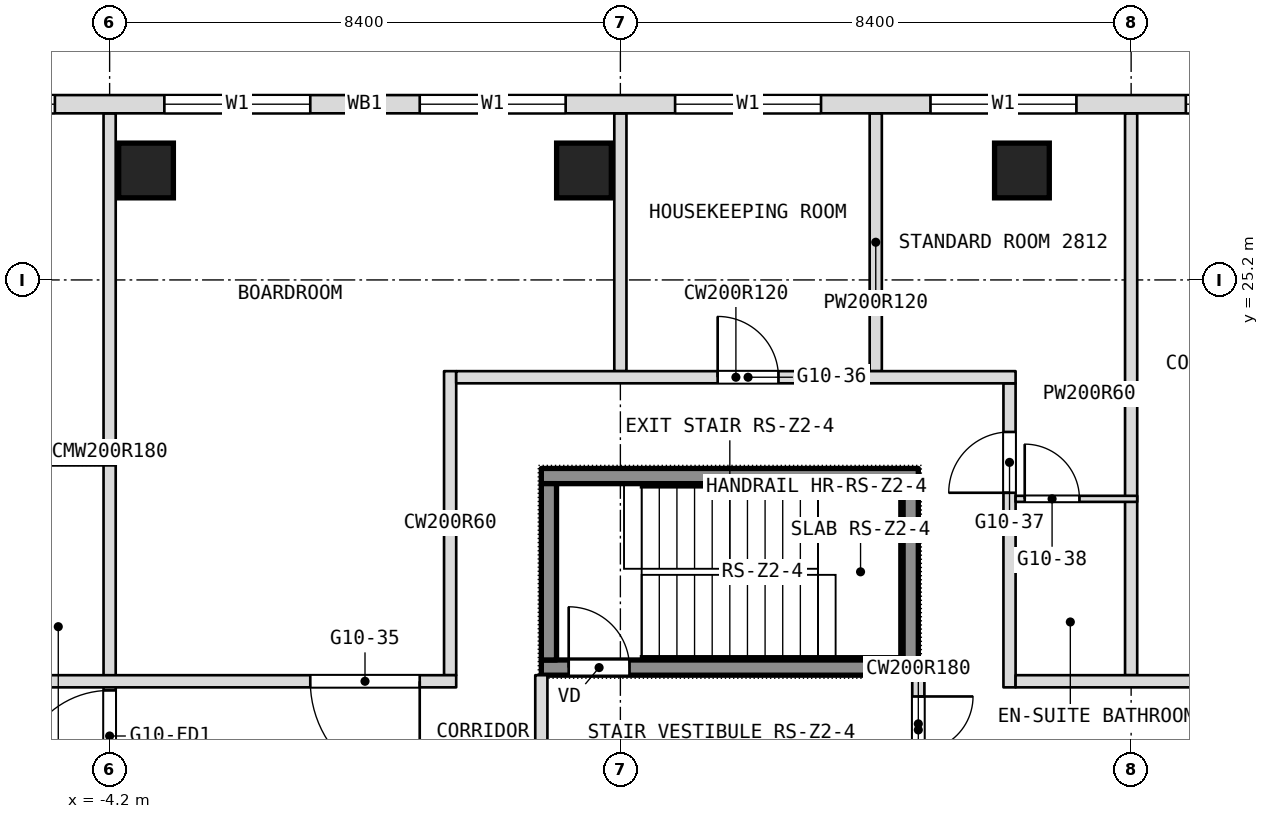
"""IFC4 building model, lengths in metres.
Left out: names, types, materials, properties, quantities, classifications, styles, units other than length and angle.
Written with IfcOpenShell. Run it as: python <this file> out.ifc"""

import sys

from ifc_helpers import new_model, si_unit, direction, frame, frame_2d, origin, origin_2d, place, context, subcontext, project, spatial, rectangle, extrude, element, fill, save


model = new_model("IFC4")
c1 = context("Model", 3, precision=1e-05, world=origin(), true_north=direction((0.0, 1.0)))
c2 = subcontext(c1, "Body", "Model", "MODEL_VIEW")
j1 = project(units=[si_unit("LENGTHUNIT", "METRE"), si_unit("PLANEANGLEUNIT", "RADIAN")], contexts=[c1])
p1 = place(None, origin())
s1 = spatial("IfcSite", under=j1, at=p1, CompositionType="ELEMENT")
p2 = place(p1, origin())
s2 = spatial("IfcBuilding", under=s1, at=p2, CompositionType="ELEMENT")
p3 = place(p2, frame((0.0, 0.0, 126.5)))
s3 = spatial("IfcBuildingStorey", under=s2, at=p3, CompositionType="ELEMENT", Elevation=126.5)
for number, where, z_axis, x_axis in (
    (1, (-3.601, 27.0, 0.0), (0.0, 0.0, 1.0), (1.0, 0.0, 0.0)),
    (2, (3.601, 27.0, 0.0), (0.0, 0.0, 1.0), (1.0, 0.0, 0.0)),
    (3, (10.804, 27.0, 0.0), (0.0, 0.0, 1.0), (1.0, 0.0, 0.0)),
):
    element("IfcColumn", number, at=place(p3, frame(where, z_axis=z_axis, x_axis=x_axis)), inside=s3, PredefinedType="COLUMN", context=c2, shape_type="SweptSolid", body=[
        extrude(rectangle(XDim=0.9, YDim=0.9, at=origin_2d()), origin(), (0.0, 0.0, 1.0), 3.6),
    ])
p4 = place(p3, frame((12.6, 18.7, 0.0), z_axis=(0.0, 0.0, 1.0), x_axis=(0.0, 1.0, 0.0)))
e4 = element("IfcWall", 4, at=p4, inside=s3, PredefinedType="PARTITIONING", context=c2, shape_type="SweptSolid", body=[
    extrude(rectangle(XDim=9.24, YDim=0.2, at=frame_2d((4.62, 0.0))), origin(), (0.0, 0.0, 1.0), 3.34),
])
p5 = place(p3, frame((10.6, 18.5, 0.0), z_axis=(0.0, 0.0, 1.0), x_axis=(0.0, 1.0, 0.0)))
e5 = element("IfcWall", 5, at=p5, inside=s3, PredefinedType="PARTITIONING", context=c2, shape_type="SweptSolid", body=[
    extrude(rectangle(XDim=5.0, YDim=0.2, at=frame_2d((2.5, 0.0))), origin(), (0.0, 0.0, 1.0), 3.34),
])
p6 = place(p5, frame((3.2, 0.0, 0.0)))
e6 = element("IfcOpeningElement", 6, at=p6, cuts=e5, PredefinedType="OPENING", context=c2, shape_type="SweptSolid", body=[
    extrude(rectangle(XDim=1.0, YDim=2.1, at=frame_2d((0.5, 1.05))), frame((0.0, 0.1, 0.0), z_axis=(0.0, -1.0, 0.0), x_axis=(1.0, 0.0, 0.0)), (0.0, 0.0, 1.0), 0.2),
])
p7 = place(p3, frame((9.1, 16.9, 0.0), z_axis=(0.0, 0.0, 1.0), x_axis=(0.0, 1.0, 0.0)))
e7 = element("IfcWall", 7, at=p7, inside=s3, PredefinedType="PARTITIONING", context=c2, shape_type="SweptSolid", body=[
    extrude(rectangle(XDim=1.8, YDim=0.2, at=frame_2d((0.9, 0.0))), origin(), (0.0, 0.0, 1.0), 3.34),
])
p8 = place(p7, frame((0.55, 0.0, 0.0)))
e8 = element("IfcOpeningElement", 8, at=p8, cuts=e7, PredefinedType="OPENING", context=c2, shape_type="SweptSolid", body=[
    extrude(rectangle(XDim=0.9, YDim=2.1, at=frame_2d((0.45, 1.05))), frame((0.0, 0.1, 0.0), z_axis=(0.0, -1.0, 0.0), x_axis=(1.0, 0.0, 0.0)), (0.0, 0.0, 1.0), 0.2),
])
for number, where, z_axis, x_axis in (
    (9, (8.4, 23.7, 0.0), (0.0, 0.0, 1.0), (0.0, 1.0, 0.0)),
    (10, (4.2, 23.7, 0.0), (0.0, 0.0, 1.0), (0.0, 1.0, 0.0)),
):
    element("IfcWall", number, at=place(p3, frame(where, z_axis=z_axis, x_axis=x_axis)), inside=s3, PredefinedType="PARTITIONING", context=c2, shape_type="SweptSolid", body=[
        extrude(rectangle(XDim=4.24, YDim=0.2, at=frame_2d((2.12, 0.0))), origin(), (0.0, 0.0, 1.0), 3.34),
    ])
p9 = place(p3, frame((2.9, 16.9, 0.0), z_axis=(0.0, 0.0, 1.0), x_axis=(0.0, 1.0, 0.0)))
e11 = element("IfcWall", 11, at=p9, inside=s3, PredefinedType="PARTITIONING", context=c2, shape_type="SweptSolid", body=[
    extrude(rectangle(XDim=1.8, YDim=0.2, at=frame_2d((0.9, 0.0))), origin(), (0.0, 0.0, 1.0), 3.34),
])
p10 = place(p3, frame((1.4, 18.7, 0.0), z_axis=(0.0, 0.0, 1.0), x_axis=(0.0, 1.0, 0.0)))
e12 = element("IfcWall", 12, at=p10, inside=s3, PredefinedType="PARTITIONING", context=c2, shape_type="SweptSolid", body=[
    extrude(rectangle(XDim=5.0, YDim=0.2, at=frame_2d((2.5, 0.0))), origin(), (0.0, 0.0, 1.0), 3.34),
])
p11 = place(p3, frame((-4.2, 16.8, 0.0), z_axis=(0.0, 0.0, 1.0), x_axis=(0.0, 1.0, 0.0)))
e13 = element("IfcWall", 13, at=p11, inside=s3, PredefinedType="PARTITIONING", context=c2, shape_type="SweptSolid", body=[
    extrude(rectangle(XDim=11.14, YDim=0.2, at=frame_2d((5.57, 0.0))), origin(), (0.0, 0.0, 1.0), 3.34),
])
p12 = place(p11, frame((0.15, 0.0, 0.0)))
e14 = element("IfcOpeningElement", 14, at=p12, cuts=e13, PredefinedType="OPENING", context=c2, shape_type="SweptSolid", body=[
    extrude(rectangle(XDim=1.5, YDim=2.1, at=frame_2d((0.75, 1.05))), frame((0.0, 0.1, 0.0), z_axis=(0.0, -1.0, 0.0), x_axis=(1.0, 0.0, 0.0)), (0.0, 0.0, 1.0), 0.2),
])
p13 = place(p3, frame((-16.9, 18.6, 0.0), z_axis=(0.0, 0.0, 1.0), x_axis=(1.0, 0.0, 0.0)))
e15 = element("IfcWall", 15, at=p13, inside=s3, PredefinedType="PARTITIONING", context=c2, shape_type="SweptSolid", body=[
    extrude(rectangle(XDim=18.4, YDim=0.2, at=frame_2d((9.2, 0.0))), origin(), (0.0, 0.0, 1.0), 3.34),
])
p14 = place(p13, frame((0.5, 0.0, 0.0)))
e16 = element("IfcOpeningElement", 16, at=p14, cuts=e15, PredefinedType="OPENING", context=c2, shape_type="SweptSolid", body=[
    extrude(rectangle(XDim=1.0, YDim=2.1, at=frame_2d((0.5, 1.05))), frame((0.0, 0.1, 0.0), z_axis=(0.0, -1.0, 0.0), x_axis=(1.0, 0.0, 0.0)), (0.0, 0.0, 1.0), 0.2),
])
p15 = place(p13, frame((8.0, 0.0, 0.0)))
e17 = element("IfcOpeningElement", 17, at=p15, cuts=e15, PredefinedType="OPENING", context=c2, shape_type="SweptSolid", body=[
    extrude(rectangle(XDim=1.1, YDim=2.1, at=frame_2d((0.55, 1.05))), frame((0.0, 0.1, 0.0), z_axis=(0.0, -1.0, 0.0), x_axis=(1.0, 0.0, 0.0)), (0.0, 0.0, 1.0), 0.2),
])
p16 = place(p13, frame((16.0, 0.0, 0.0)))
e18 = element("IfcOpeningElement", 18, at=p16, cuts=e15, PredefinedType="OPENING", context=c2, shape_type="SweptSolid", body=[
    extrude(rectangle(XDim=1.8, YDim=2.1, at=frame_2d((0.9, 1.05))), frame((0.0, 0.1, 0.0), z_axis=(0.0, -1.0, 0.0), x_axis=(1.0, 0.0, 0.0)), (0.0, 0.0, 1.0), 0.2),
])
p17 = place(p3, frame((10.7, 18.6, 0.0), z_axis=(0.0, 0.0, 1.0), x_axis=(1.0, 0.0, 0.0)))
e19 = element("IfcWall", 19, at=p17, inside=s3, PredefinedType="PARTITIONING", context=c2, shape_type="SweptSolid", body=[
    extrude(rectangle(XDim=6.2, YDim=0.2, at=frame_2d((3.1, 0.0))), origin(), (0.0, 0.0, 1.0), 3.34),
])
p18 = place(p17, frame((3.5, 0.0, 0.0)))
e20 = element("IfcOpeningElement", 20, at=p18, cuts=e19, PredefinedType="OPENING", context=c2, shape_type="SweptSolid", body=[
    extrude(rectangle(XDim=1.0, YDim=2.1, at=frame_2d((0.5, 1.05))), frame((0.0, 0.1, 0.0), z_axis=(0.0, -1.0, 0.0), x_axis=(1.0, 0.0, 0.0)), (0.0, 0.0, 1.0), 0.2),
])
p19 = place(p3, frame((10.7, 21.6, 0.0), z_axis=(0.0, 0.0, 1.0), x_axis=(1.0, 0.0, 0.0)))
e21 = element("IfcWall", 21, at=p19, inside=s3, PredefinedType="PARTITIONING", context=c2, shape_type="SweptSolid", body=[
    extrude(rectangle(XDim=2.0, YDim=0.1, at=frame_2d((1.0, 0.0))), origin(), (0.0, 0.0, 1.0), 3.34),
])
p20 = place(p19, frame((0.15, 0.0, 0.0)))
e22 = element("IfcOpeningElement", 22, at=p20, cuts=e21, PredefinedType="OPENING", context=c2, shape_type="SweptSolid", body=[
    extrude(rectangle(XDim=0.9, YDim=2.1, at=frame_2d((0.45, 1.05))), frame((0.0, 0.05, 0.0), z_axis=(0.0, -1.0, 0.0), x_axis=(1.0, 0.0, 0.0)), (0.0, 0.0, 1.0), 0.1),
])
p21 = place(p3, frame((-6.65, 22.2, 0.0), z_axis=(0.0, 0.0, 1.0), x_axis=(1.0, 0.0, 0.0)))
e23 = element("IfcWall", 23, at=p21, inside=s3, PredefinedType="PARTITIONING", context=c2, shape_type="SweptSolid", body=[
    extrude(rectangle(XDim=2.55, YDim=0.1, at=frame_2d((1.275, 0.0))), origin(), (0.0, 0.0, 1.0), 3.34),
])
p22 = place(p3, frame((1.5, 23.6, 0.0), z_axis=(0.0, 0.0, 1.0), x_axis=(1.0, 0.0, 0.0)))
e24 = element("IfcWall", 24, at=p22, inside=s3, PredefinedType="PARTITIONING", context=c2, shape_type="SweptSolid", body=[
    extrude(rectangle(XDim=9.2, YDim=0.2, at=frame_2d((4.6, 0.0))), origin(), (0.0, 0.0, 1.0), 3.34),
])
p23 = place(p22, frame((4.3, 0.0, 0.0)))
e25 = element("IfcOpeningElement", 25, at=p23, cuts=e24, PredefinedType="OPENING", context=c2, shape_type="SweptSolid", body=[
    extrude(rectangle(XDim=1.0, YDim=2.1, at=frame_2d((0.5, 1.05))), frame((0.0, 0.1, 0.0), z_axis=(0.0, -1.0, 0.0), x_axis=(1.0, 0.0, 0.0)), (0.0, 0.0, 1.0), 0.2),
])
p24 = place(p3, frame((21.306, 28.09, 0.0), z_axis=(0.0, 0.0, 1.0), x_axis=(-1.0, 0.0, 0.0)))
e26 = element("IfcWall", 26, at=p24, inside=s3, PredefinedType="NOTDEFINED", context=c2, shape_type="SweptSolid", body=[
    extrude(rectangle(XDim=42.612, YDim=0.3, at=frame_2d((21.306, 0.0))), origin(), (0.0, 0.0, 1.0), 3.6),
])
p25 = place(p24, frame((5.406, 0.0, 0.9)))
e27 = element("IfcOpeningElement", 27, at=p25, cuts=e26, PredefinedType="OPENING", context=c2, shape_type="SweptSolid", body=[
    extrude(rectangle(XDim=2.4, YDim=2.1, at=frame_2d((1.2, 1.05))), frame((0.0, 0.15, 0.0), z_axis=(0.0, -1.0, 0.0), x_axis=(1.0, 0.0, 0.0)), (0.0, 0.0, 1.0), 0.3),
])
p26 = place(p24, frame((9.606, 0.0, 0.9)))
e28 = element("IfcOpeningElement", 28, at=p26, cuts=e26, PredefinedType="OPENING", context=c2, shape_type="SweptSolid", body=[
    extrude(rectangle(XDim=2.4, YDim=2.1, at=frame_2d((1.2, 1.05))), frame((0.0, 0.15, 0.0), z_axis=(0.0, -1.0, 0.0), x_axis=(1.0, 0.0, 0.0)), (0.0, 0.0, 1.0), 0.3),
])
p27 = place(p24, frame((13.806, 0.0, 0.9)))
e29 = element("IfcOpeningElement", 29, at=p27, cuts=e26, PredefinedType="OPENING", context=c2, shape_type="SweptSolid", body=[
    extrude(rectangle(XDim=2.4, YDim=2.1, at=frame_2d((1.2, 1.05))), frame((0.0, 0.15, 0.0), z_axis=(0.0, -1.0, 0.0), x_axis=(1.0, 0.0, 0.0)), (0.0, 0.0, 1.0), 0.3),
])
p28 = place(p24, frame((18.006, 0.0, 0.9)))
e30 = element("IfcOpeningElement", 30, at=p28, cuts=e26, PredefinedType="OPENING", context=c2, shape_type="SweptSolid", body=[
    extrude(rectangle(XDim=2.4, YDim=2.1, at=frame_2d((1.2, 1.05))), frame((0.0, 0.15, 0.0), z_axis=(0.0, -1.0, 0.0), x_axis=(1.0, 0.0, 0.0)), (0.0, 0.0, 1.0), 0.3),
])
p29 = place(p24, frame((22.206, 0.0, 0.9)))
e31 = element("IfcOpeningElement", 31, at=p29, cuts=e26, PredefinedType="OPENING", context=c2, shape_type="SweptSolid", body=[
    extrude(rectangle(XDim=2.4, YDim=2.1, at=frame_2d((1.2, 1.05))), frame((0.0, 0.15, 0.0), z_axis=(0.0, -1.0, 0.0), x_axis=(1.0, 0.0, 0.0)), (0.0, 0.0, 1.0), 0.3),
])
p30 = place(p24, frame((26.406, 0.0, 0.9)))
e32 = element("IfcOpeningElement", 32, at=p30, cuts=e26, PredefinedType="OPENING", context=c2, shape_type="SweptSolid", body=[
    extrude(rectangle(XDim=2.4, YDim=2.1, at=frame_2d((1.2, 1.05))), frame((0.0, 0.15, 0.0), z_axis=(0.0, -1.0, 0.0), x_axis=(1.0, 0.0, 0.0)), (0.0, 0.0, 1.0), 0.3),
])
p31 = place(p24, frame((30.606, 0.0, 0.9)))
e33 = element("IfcOpeningElement", 33, at=p31, cuts=e26, PredefinedType="OPENING", context=c2, shape_type="SweptSolid", body=[
    extrude(rectangle(XDim=2.4, YDim=2.1, at=frame_2d((1.2, 1.05))), frame((0.0, 0.15, 0.0), z_axis=(0.0, -1.0, 0.0), x_axis=(1.0, 0.0, 0.0)), (0.0, 0.0, 1.0), 0.3),
])
p32 = place(p24, frame((34.806, 0.0, 0.9)))
e34 = element("IfcOpeningElement", 34, at=p32, cuts=e26, PredefinedType="OPENING", context=c2, shape_type="SweptSolid", body=[
    extrude(rectangle(XDim=2.4, YDim=2.1, at=frame_2d((1.2, 1.05))), frame((0.0, 0.15, 0.0), z_axis=(0.0, -1.0, 0.0), x_axis=(1.0, 0.0, 0.0)), (0.0, 0.0, 1.0), 0.3),
])
p33 = place(p3, frame((2.9, 18.825, 0.1), z_axis=(0.0, 0.0, 1.0), x_axis=(1.0, 0.0, 0.0)))
e35 = element("IfcWall", 35, at=p33, inside=s3, PredefinedType="SHEAR", context=c2, shape_type="SweptSolid", body=[
    extrude(rectangle(XDim=6.2, YDim=0.25, at=frame_2d((3.1, 0.0))), origin(), (0.0, 0.0, 1.0), 3.6),
])
p34 = place(p33, frame((0.45, 0.0, 0.0)))
e36 = element("IfcOpeningElement", 36, at=p34, cuts=e35, PredefinedType="OPENING", context=c2, shape_type="SweptSolid", body=[
    extrude(rectangle(XDim=1.0, YDim=2.1, at=frame_2d((0.5, 1.05))), frame((0.0, 0.125, 0.0), z_axis=(0.0, -1.0, 0.0), x_axis=(1.0, 0.0, 0.0)), (0.0, 0.0, 1.0), 0.25),
])
p35 = place(p3, frame((2.9, 21.975, 0.1), z_axis=(0.0, 0.0, 1.0), x_axis=(1.0, 0.0, 0.0)))
e37 = element("IfcWall", 37, at=p35, inside=s3, PredefinedType="SHEAR", context=c2, shape_type="SweptSolid", body=[
    extrude(rectangle(XDim=6.2, YDim=0.25, at=frame_2d((3.1, 0.0))), origin(), (0.0, 0.0, 1.0), 3.6),
])
for number, where, z_axis, x_axis in (
    (38, (3.025, 18.95, 0.1), (0.0, 0.0, 1.0), (0.0, 1.0, 0.0)),
    (39, (8.975, 18.95, 0.1), (0.0, 0.0, 1.0), (0.0, 1.0, 0.0)),
):
    element("IfcWall", number, at=place(p3, frame(where, z_axis=z_axis, x_axis=x_axis)), inside=s3, PredefinedType="SHEAR", context=c2, shape_type="SweptSolid", body=[
        extrude(rectangle(XDim=2.9, YDim=0.25, at=frame_2d((1.45, 0.0))), origin(), (0.0, 0.0, 1.0), 3.6),
    ])
p36 = place(p6, origin())
e40 = element("IfcDoor", 40, at=p36, inside=s3, OperationType="SINGLE_SWING_LEFT", PredefinedType="DOOR", context=c2, shape_type="SweptSolid", body=[
    extrude(rectangle(XDim=1.0, YDim=2.1, at=frame_2d((0.5, 1.05))), frame((0.0, 0.025, 0.0), z_axis=(0.0, -1.0, 0.0), x_axis=(1.0, 0.0, 0.0)), (0.0, 0.0, 1.0), 0.05),
])
fill(e6, e40)
p37 = place(p8, origin())
e41 = element("IfcDoor", 41, at=p37, inside=s3, OperationType="SINGLE_SWING_RIGHT", PredefinedType="DOOR", context=c2, shape_type="SweptSolid", body=[
    extrude(rectangle(XDim=0.9, YDim=2.1, at=frame_2d((0.45, 1.05))), frame((0.0, 0.025, 0.0), z_axis=(0.0, -1.0, 0.0), x_axis=(1.0, 0.0, 0.0)), (0.0, 0.0, 1.0), 0.05),
])
fill(e8, e41)
p38 = place(p16, origin())
e42 = element("IfcDoor", 42, at=p38, inside=s3, OperationType="DOUBLE_DOOR_SINGLE_SWING", PredefinedType="DOOR", context=c2, shape_type="SweptSolid", body=[
    extrude(rectangle(XDim=1.8, YDim=2.1, at=frame_2d((0.9, 1.05))), frame((0.0, 0.025, 0.0), z_axis=(0.0, -1.0, 0.0), x_axis=(1.0, 0.0, 0.0)), (0.0, 0.0, 1.0), 0.05),
])
fill(e18, e42)
p39 = place(p20, origin())
e43 = element("IfcDoor", 43, at=p39, inside=s3, OperationType="SINGLE_SWING_RIGHT", PredefinedType="DOOR", context=c2, shape_type="SweptSolid", body=[
    extrude(rectangle(XDim=0.9, YDim=2.1, at=frame_2d((0.45, 1.05))), frame((0.0, 0.025, 0.0), z_axis=(0.0, -1.0, 0.0), x_axis=(1.0, 0.0, 0.0)), (0.0, 0.0, 1.0), 0.05),
])
fill(e22, e43)
p40 = place(p23, origin())
e44 = element("IfcDoor", 44, at=p40, inside=s3, OperationType="SINGLE_SWING_LEFT", PredefinedType="DOOR", context=c2, shape_type="SweptSolid", body=[
    extrude(rectangle(XDim=1.0, YDim=2.1, at=frame_2d((0.5, 1.05))), frame((0.0, 0.025, 0.0), z_axis=(0.0, -1.0, 0.0), x_axis=(1.0, 0.0, 0.0)), (0.0, 0.0, 1.0), 0.05),
])
fill(e25, e44)
p41 = place(p25, origin())
e45 = element("IfcWindow", 45, at=p41, inside=s3, PartitioningType="SINGLE_PANEL", PredefinedType="WINDOW", context=c2, shape_type="SweptSolid", body=[
    extrude(rectangle(XDim=2.4, YDim=2.1, at=frame_2d((1.2, 1.05))), frame((0.0, 0.03, 0.0), z_axis=(0.0, -1.0, 0.0), x_axis=(1.0, 0.0, 0.0)), (0.0, 0.0, 1.0), 0.06),
])
fill(e27, e45)
p42 = place(p26, origin())
e46 = element("IfcWindow", 46, at=p42, inside=s3, PartitioningType="SINGLE_PANEL", PredefinedType="WINDOW", context=c2, shape_type="SweptSolid", body=[
    extrude(rectangle(XDim=2.4, YDim=2.1, at=frame_2d((1.2, 1.05))), frame((0.0, 0.03, 0.0), z_axis=(0.0, -1.0, 0.0), x_axis=(1.0, 0.0, 0.0)), (0.0, 0.0, 1.0), 0.06),
])
fill(e28, e46)
p43 = place(p27, origin())
e47 = element("IfcWindow", 47, at=p43, inside=s3, PartitioningType="SINGLE_PANEL", PredefinedType="WINDOW", context=c2, shape_type="SweptSolid", body=[
    extrude(rectangle(XDim=2.4, YDim=2.1, at=frame_2d((1.2, 1.05))), frame((0.0, 0.03, 0.0), z_axis=(0.0, -1.0, 0.0), x_axis=(1.0, 0.0, 0.0)), (0.0, 0.0, 1.0), 0.06),
])
fill(e29, e47)
p44 = place(p28, origin())
e48 = element("IfcWindow", 48, at=p44, inside=s3, PartitioningType="SINGLE_PANEL", PredefinedType="WINDOW", context=c2, shape_type="SweptSolid", body=[
    extrude(rectangle(XDim=2.4, YDim=2.1, at=frame_2d((1.2, 1.05))), frame((0.0, 0.03, 0.0), z_axis=(0.0, -1.0, 0.0), x_axis=(1.0, 0.0, 0.0)), (0.0, 0.0, 1.0), 0.06),
])
fill(e30, e48)
p45 = place(p29, origin())
e49 = element("IfcWindow", 49, at=p45, inside=s3, PartitioningType="SINGLE_PANEL", PredefinedType="WINDOW", context=c2, shape_type="SweptSolid", body=[
    extrude(rectangle(XDim=2.4, YDim=2.1, at=frame_2d((1.2, 1.05))), frame((0.0, 0.03, 0.0), z_axis=(0.0, -1.0, 0.0), x_axis=(1.0, 0.0, 0.0)), (0.0, 0.0, 1.0), 0.06),
])
fill(e31, e49)
p46 = place(p30, origin())
e50 = element("IfcWindow", 50, at=p46, inside=s3, PartitioningType="SINGLE_PANEL", PredefinedType="WINDOW", context=c2, shape_type="SweptSolid", body=[
    extrude(rectangle(XDim=2.4, YDim=2.1, at=frame_2d((1.2, 1.05))), frame((0.0, 0.03, 0.0), z_axis=(0.0, -1.0, 0.0), x_axis=(1.0, 0.0, 0.0)), (0.0, 0.0, 1.0), 0.06),
])
fill(e32, e50)
p47 = place(p34, origin())
e51 = element("IfcDoor", 51, at=p47, inside=s3, OperationType="SINGLE_SWING_LEFT", PredefinedType="DOOR", context=c2, shape_type="SweptSolid", body=[
    extrude(rectangle(XDim=1.0, YDim=2.1, at=frame_2d((0.5, 1.05))), frame((0.0, 0.025, 0.0), z_axis=(0.0, -1.0, 0.0), x_axis=(1.0, 0.0, 0.0)), (0.0, 0.0, 1.0), 0.05),
])
fill(e36, e51)
p48 = place(p12, origin())
e52 = element("IfcDoor", 52, at=p48, inside=s3, OperationType="DOUBLE_DOOR_DOUBLE_SWING", PredefinedType="DOOR", context=c2, shape_type="SweptSolid", body=[
    extrude(rectangle(XDim=1.5, YDim=2.1, at=frame_2d((0.75, 1.05))), frame((0.0, 0.025, 0.0), z_axis=(0.0, -1.0, 0.0), x_axis=(1.0, 0.0, 0.0)), (0.0, 0.0, 1.0), 0.05),
])
fill(e14, e52)
save(model, sys.argv[1])
